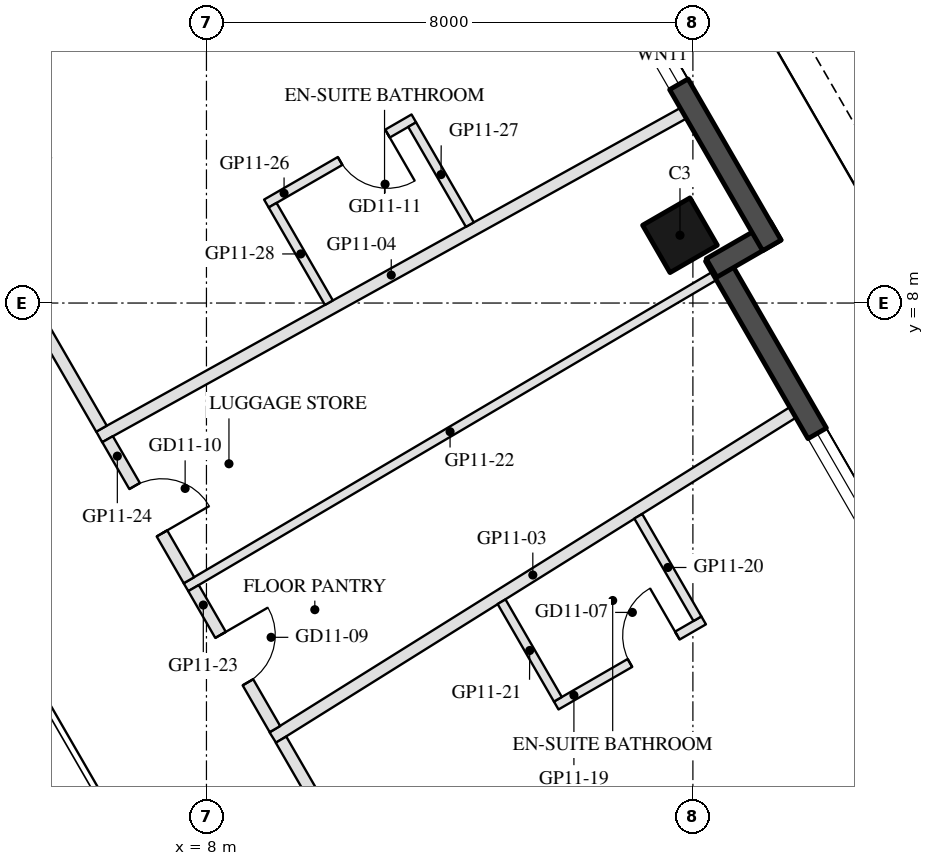
"""IFC4 building model, lengths in metres.
Left out: names, types, materials, properties, quantities, classifications, styles, units other than length and angle.
Written with IfcOpenShell. Run it as: python <this file> out.ifc"""

import sys

from ifc_helpers import new_model, si_unit, direction, frame, frame_2d, origin, origin_2d, place, context, subcontext, project, spatial, rectangle, hollow_rectangle, extrude, element, fill, save


model = new_model("IFC4")
c1 = context("Model", 3, precision=1e-05, world=origin(), true_north=direction((0.0, 1.0)))
c2 = subcontext(c1, "Body", "Model", "MODEL_VIEW")
j1 = project(units=[si_unit("LENGTHUNIT", "METRE"), si_unit("PLANEANGLEUNIT", "RADIAN")], contexts=[c1])
p1 = place(None, origin())
s1 = spatial("IfcSite", under=j1, at=p1, CompositionType="ELEMENT")
p2 = place(p1, origin())
s2 = spatial("IfcBuilding", under=s1, at=p2, CompositionType="ELEMENT")
p3 = place(p2, frame((0.0, 0.0, 127.9)))
s3 = spatial("IfcBuildingStorey", under=s2, at=p3, CompositionType="ELEMENT", Elevation=127.9)
p4 = place(p3, frame((15.788, 9.115, 0.0), z_axis=(0.0, 0.0, 1.0), x_axis=(-0.5, 0.866025403784, 0.0)))
e1 = element("IfcColumn", 1, at=p4, inside=s3, PredefinedType="COLUMN", context=c2, shape_type="SweptSolid", body=[
    extrude(hollow_rectangle(XDim=0.9, YDim=0.9, WallThickness=0.04, at=origin_2d()), origin(), (0.0, 0.0, 1.0), 3.7),
])
p5 = place(p3, frame((19.729, 2.938, 0.0), z_axis=(0.0, 0.0, 1.0), x_axis=(-0.499976430342, 0.866039011305, 0.0)))
e2 = element("IfcWall", 2, at=p5, inside=s3, PredefinedType="SOLIDWALL", context=c2, shape_type="SweptSolid", body=[
    extrude(rectangle(XDim=6.74, YDim=0.35, at=frame_2d((3.37, 0.0))), origin(), (0.0, 0.0, 1.0), 3.45),
])
p6 = place(p5, frame((0.77, 0.0, 0.3)))
e3 = element("IfcOpeningElement", 3, at=p6, cuts=e2, PredefinedType="OPENING", context=c2, shape_type="SweptSolid", body=[
    extrude(rectangle(XDim=2.6, YDim=2.65, at=frame_2d((1.3, 1.325))), frame((0.0, 0.185, 0.0), z_axis=(0.0, -1.0, 0.0), x_axis=(1.0, 0.0, 0.0)), (0.0, 0.0, 1.0), 0.37),
])
p7 = place(p3, frame((16.306, 8.577, 0.0), z_axis=(0.0, 0.0, 1.0), x_axis=(0.866092288191, 0.499884134912, 0.0)))
e4 = element("IfcWall", 4, at=p7, inside=s3, PredefinedType="SOLIDWALL", context=c2, shape_type="SweptSolid", body=[
    extrude(rectangle(XDim=1.22, YDim=0.35, at=frame_2d((0.61, 0.0))), origin(), (0.0, 0.0, 1.0), 3.45),
])
p8 = place(p3, frame((17.299, 8.948, 0.0), z_axis=(0.0, 0.0, 1.0), x_axis=(-0.500010041276, 0.866019606374, 0.0)))
e5 = element("IfcWall", 5, at=p8, inside=s3, PredefinedType="SOLIDWALL", context=c2, shape_type="SweptSolid", body=[
    extrude(rectangle(XDim=9.7, YDim=0.35, at=frame_2d((4.85, 0.0))), origin(), (0.0, 0.0, 1.0), 3.45),
])
p9 = place(p8, frame((3.06, 0.0, 0.3)))
e6 = element("IfcOpeningElement", 6, at=p9, cuts=e5, PredefinedType="OPENING", context=c2, shape_type="SweptSolid", body=[
    extrude(rectangle(XDim=1.1, YDim=2.65, at=frame_2d((0.55, 1.325))), frame((0.0, 0.185, 0.0), z_axis=(0.0, -1.0, 0.0), x_axis=(1.0, 0.0, 0.0)), (0.0, 0.0, 1.0), 0.37),
])
p10 = place(p8, frame((4.949, 0.0, 0.3)))
e7 = element("IfcOpeningElement", 7, at=p10, cuts=e5, PredefinedType="OPENING", context=c2, shape_type="SweptSolid", body=[
    extrude(rectangle(XDim=3.0, YDim=2.65, at=frame_2d((1.5, 1.325))), frame((0.0, 0.185, 0.0), z_axis=(0.0, -1.0, 0.0), x_axis=(1.0, 0.0, 0.0)), (0.0, 0.0, 1.0), 0.37),
])
p11 = place(p3, frame((17.643, 6.201, 0.0), z_axis=(0.0, 0.0, 1.0), x_axis=(-0.84787317287, -0.530199097252, 0.0)))
e8 = element("IfcWall", 8, at=p11, inside=s3, PredefinedType="PARTITIONING", context=c2, shape_type="SweptSolid", body=[
    extrude(rectangle(XDim=10.086, YDim=0.2, at=frame_2d((5.043, 0.0))), origin(), (0.0, 0.0, 1.0), 2.76),
])
p12 = place(p3, frame((15.842, 11.121, 0.0), z_axis=(0.0, 0.0, 1.0), x_axis=(-0.87471248602, -0.484642204931, 0.0)))
e9 = element("IfcWall", 9, at=p12, inside=s3, PredefinedType="PARTITIONING", context=c2, shape_type="SweptSolid", body=[
    extrude(rectangle(XDim=10.982, YDim=0.2, at=frame_2d((5.491, 0.0))), origin(), (0.0, 0.0, 1.0), 2.86),
])
p13 = place(p3, frame((9.226, 0.819, 0.0), z_axis=(0.0, 0.0, 1.0), x_axis=(0.500031571837, -0.866007175009, 0.0)))
e10 = element("IfcWall", 10, at=p13, inside=s3, PredefinedType="PARTITIONING", context=c2, shape_type="SweptSolid", body=[
    extrude(rectangle(XDim=6.084, YDim=0.2, at=frame_2d((3.042, 0.0))), origin(), (0.0, 0.0, 1.0), 2.76),
])
p14 = place(p13, frame((2.542, 0.0, 0.0)))
e11 = element("IfcOpeningElement", 11, at=p14, cuts=e10, PredefinedType="OPENING", context=c2, shape_type="SweptSolid", body=[
    extrude(rectangle(XDim=1.0, YDim=2.1, at=frame_2d((0.5, 1.05))), frame((0.0, 0.11, 0.0), z_axis=(0.0, -1.0, 0.0), x_axis=(1.0, 0.0, 0.0)), (0.0, 0.0, 1.0), 0.22),
])
p15 = place(p3, frame((13.752, 1.381, 0.0), z_axis=(0.0, 0.0, 1.0), x_axis=(0.866034573852, 0.49998411664, 0.0)))
e12 = element("IfcWall", 12, at=p15, inside=s3, PredefinedType="PARTITIONING", context=c2, shape_type="SweptSolid", body=[
    extrude(rectangle(XDim=2.8, YDim=0.15, at=frame_2d((1.4, 0.0))), origin(), (0.0, 0.0, 1.0), 3.45),
])
p16 = place(p15, frame((1.4, 0.0, 0.0)))
e13 = element("IfcOpeningElement", 13, at=p16, cuts=e12, PredefinedType="OPENING", context=c2, shape_type="SweptSolid", body=[
    extrude(rectangle(XDim=0.9, YDim=2.1, at=frame_2d((0.45, 1.05))), frame((0.0, 0.085, 0.0), z_axis=(0.0, -1.0, 0.0), x_axis=(1.0, 0.0, 0.0)), (0.0, 0.0, 1.0), 0.17),
])
p17 = place(p3, frame((16.075, 2.808, 0.0), z_axis=(0.0, 0.0, 1.0), x_axis=(-0.500051850797, 0.865995465643, 0.0)))
e14 = element("IfcWall", 14, at=p17, inside=s3, PredefinedType="PARTITIONING", context=c2, shape_type="SweptSolid", body=[
    extrude(rectangle(XDim=1.946, YDim=0.15, at=frame_2d((0.973, 0.0))), origin(), (0.0, 0.0, 1.0), 2.76),
])
p18 = place(p3, frame((13.78, 1.483, 0.0), z_axis=(0.0, 0.0, 1.0), x_axis=(-0.499965806267, 0.866045144646, 0.0)))
e15 = element("IfcWall", 15, at=p18, inside=s3, PredefinedType="PARTITIONING", context=c2, shape_type="SweptSolid", body=[
    extrude(rectangle(XDim=1.853, YDim=0.15, at=frame_2d((0.926, 0.0))), origin(), (0.0, 0.0, 1.0), 2.76),
])
p19 = place(p3, frame((16.349, 8.443, 0.0), z_axis=(0.0, 0.0, 1.0), x_axis=(-0.861589721102, -0.507605311724, 0.0)))
e16 = element("IfcWall", 16, at=p19, inside=s3, PredefinedType="PARTITIONING", context=c2, shape_type="SweptSolid", body=[
    extrude(rectangle(XDim=10.081, YDim=0.15, at=frame_2d((5.04, 0.0))), origin(), (0.0, 0.0, 1.0), 2.86),
])
p20 = place(p3, frame((7.788, 3.312, 0.0), z_axis=(0.0, 0.0, 1.0), x_axis=(0.499953984692, -0.866051969105, 0.0)))
e17 = element("IfcWall", 17, at=p20, inside=s3, PredefinedType="PARTITIONING", context=c2, shape_type="SweptSolid", body=[
    extrude(rectangle(XDim=2.677, YDim=0.2, at=frame_2d((1.339, 0.0))), origin(), (0.0, 0.0, 1.0), 3.45),
])
p21 = place(p20, frame((0.889, 0.0, 0.0)))
e18 = element("IfcOpeningElement", 18, at=p21, cuts=e17, PredefinedType="OPENING", context=c2, shape_type="SweptSolid", body=[
    extrude(rectangle(XDim=0.9, YDim=2.1, at=frame_2d((0.45, 1.05))), frame((0.0, 0.11, 0.0), z_axis=(0.0, -1.0, 0.0), x_axis=(1.0, 0.0, 0.0)), (0.0, 0.0, 1.0), 0.22),
])
p22 = place(p3, frame((6.374, 5.76, 0.0), z_axis=(0.0, 0.0, 1.0), x_axis=(0.499982891145, -0.866035281361, 0.0)))
e19 = element("IfcWall", 19, at=p22, inside=s3, PredefinedType="PARTITIONING", context=c2, shape_type="SweptSolid", body=[
    extrude(rectangle(XDim=2.678, YDim=0.2, at=frame_2d((1.339, 0.0))), origin(), (0.0, 0.0, 1.0), 2.76),
])
p23 = place(p22, frame((0.889, 0.0, 0.0)))
e20 = element("IfcOpeningElement", 20, at=p23, cuts=e19, PredefinedType="OPENING", context=c2, shape_type="SweptSolid", body=[
    extrude(rectangle(XDim=0.9, YDim=2.1, at=frame_2d((0.45, 1.05))), frame((0.0, 0.11, 0.0), z_axis=(0.0, -1.0, 0.0), x_axis=(1.0, 0.0, 0.0)), (0.0, 0.0, 1.0), 0.22),
])
p24 = place(p3, frame((2.281, 12.85, 0.0), z_axis=(0.0, 0.0, 1.0), x_axis=(0.499992362392, -0.866029813314, 0.0)))
e21 = element("IfcWall", 21, at=p24, inside=s3, PredefinedType="PARTITIONING", context=c2, shape_type="SweptSolid", body=[
    extrude(rectangle(XDim=7.986, YDim=0.2, at=frame_2d((3.993, 0.0))), origin(), (0.0, 0.0, 1.0), 2.76),
])
p25 = place(p24, frame((3.493, 0.0, 0.0)))
e22 = element("IfcOpeningElement", 22, at=p25, cuts=e21, PredefinedType="OPENING", context=c2, shape_type="SweptSolid", body=[
    extrude(rectangle(XDim=1.0, YDim=2.1, at=frame_2d((0.5, 1.05))), frame((0.0, 0.11, 0.0), z_axis=(0.0, -1.0, 0.0), x_axis=(1.0, 0.0, 0.0)), (0.0, 0.0, 1.0), 0.22),
])
p26 = place(p3, frame((11.41, 11.037, 0.0), z_axis=(0.0, 0.0, 1.0), x_axis=(-0.866034573852, -0.49998411664, 0.0)))
e23 = element("IfcWall", 23, at=p26, inside=s3, PredefinedType="PARTITIONING", context=c2, shape_type="SweptSolid", body=[
    extrude(rectangle(XDim=2.8, YDim=0.15, at=frame_2d((1.4, 0.0))), origin(), (0.0, 0.0, 1.0), 2.76),
])
p27 = place(p26, frame((0.5, 0.0, 0.0)))
e24 = element("IfcOpeningElement", 24, at=p27, cuts=e23, PredefinedType="OPENING", context=c2, shape_type="SweptSolid", body=[
    extrude(rectangle(XDim=0.9, YDim=2.1, at=frame_2d((0.45, 1.05))), frame((0.0, 0.085, 0.0), z_axis=(0.0, -1.0, 0.0), x_axis=(1.0, 0.0, 0.0)), (0.0, 0.0, 1.0), 0.17),
])
p28 = place(p3, frame((12.332, 9.29, 0.0), z_axis=(0.0, 0.0, 1.0), x_axis=(-0.499971120268, 0.866042076863, 0.0)))
e25 = element("IfcWall", 25, at=p28, inside=s3, PredefinedType="PARTITIONING", context=c2, shape_type="SweptSolid", body=[
    extrude(rectangle(XDim=1.898, YDim=0.15, at=frame_2d((0.949, 0.0))), origin(), (0.0, 0.0, 1.0), 3.45),
])
p29 = place(p3, frame((10.014, 8.006, 0.0), z_axis=(0.0, 0.0, 1.0), x_axis=(-0.500053484023, 0.865994522568, 0.0)))
e26 = element("IfcWall", 26, at=p29, inside=s3, PredefinedType="PARTITIONING", context=c2, shape_type="SweptSolid", body=[
    extrude(rectangle(XDim=1.851, YDim=0.15, at=frame_2d((0.926, 0.0))), origin(), (0.0, 0.0, 1.0), 3.45),
])
p30 = place(p6, origin())
e27 = element("IfcWindow", 27, at=p30, inside=s3, PartitioningType="SINGLE_PANEL", PredefinedType="WINDOW", context=c2, shape_type="SweptSolid", body=[
    extrude(rectangle(XDim=2.6, YDim=2.65, at=frame_2d((1.3, 1.325))), frame((0.0, 0.03, 0.0), z_axis=(0.0, -1.0, 0.0), x_axis=(1.0, 0.0, 0.0)), (0.0, 0.0, 1.0), 0.06),
])
fill(e3, e27)
p31 = place(p9, origin())
e28 = element("IfcWindow", 28, at=p31, inside=s3, PartitioningType="SINGLE_PANEL", PredefinedType="WINDOW", context=c2, shape_type="SweptSolid", body=[
    extrude(rectangle(XDim=1.1, YDim=2.65, at=frame_2d((0.55, 1.325))), frame((0.0, 0.03, 0.0), z_axis=(0.0, -1.0, 0.0), x_axis=(1.0, 0.0, 0.0)), (0.0, 0.0, 1.0), 0.06),
])
fill(e6, e28)
p32 = place(p16, origin())
e29 = element("IfcDoor", 29, at=p32, inside=s3, OperationType="SINGLE_SWING_RIGHT", PredefinedType="DOOR", context=c2, shape_type="SweptSolid", body=[
    extrude(rectangle(XDim=0.9, YDim=2.1, at=frame_2d((0.45, 1.05))), frame((0.0, 0.025, 0.0), z_axis=(0.0, -1.0, 0.0), x_axis=(1.0, 0.0, 0.0)), (0.0, 0.0, 1.0), 0.05),
])
fill(e13, e29)
p33 = place(p21, origin())
e30 = element("IfcDoor", 30, at=p33, inside=s3, OperationType="SINGLE_SWING_LEFT", PredefinedType="DOOR", context=c2, shape_type="SweptSolid", body=[
    extrude(rectangle(XDim=0.9, YDim=2.1, at=frame_2d((0.45, 1.05))), frame((0.0, 0.025, 0.0), z_axis=(0.0, -1.0, 0.0), x_axis=(1.0, 0.0, 0.0)), (0.0, 0.0, 1.0), 0.05),
])
fill(e18, e30)
p34 = place(p23, origin())
e31 = element("IfcDoor", 31, at=p34, inside=s3, OperationType="SINGLE_SWING_RIGHT", PredefinedType="DOOR", context=c2, shape_type="SweptSolid", body=[
    extrude(rectangle(XDim=0.9, YDim=2.1, at=frame_2d((0.45, 1.05))), frame((0.0, 0.025, 0.0), z_axis=(0.0, -1.0, 0.0), x_axis=(1.0, 0.0, 0.0)), (0.0, 0.0, 1.0), 0.05),
])
fill(e20, e31)
p35 = place(p27, origin())
e32 = element("IfcDoor", 32, at=p35, inside=s3, OperationType="SINGLE_SWING_LEFT", PredefinedType="DOOR", context=c2, shape_type="SweptSolid", body=[
    extrude(rectangle(XDim=0.9, YDim=2.1, at=frame_2d((0.45, 1.05))), frame((0.0, 0.025, 0.0), z_axis=(0.0, -1.0, 0.0), x_axis=(1.0, 0.0, 0.0)), (0.0, 0.0, 1.0), 0.05),
])
fill(e24, e32)
save(model, sys.argv[1])
